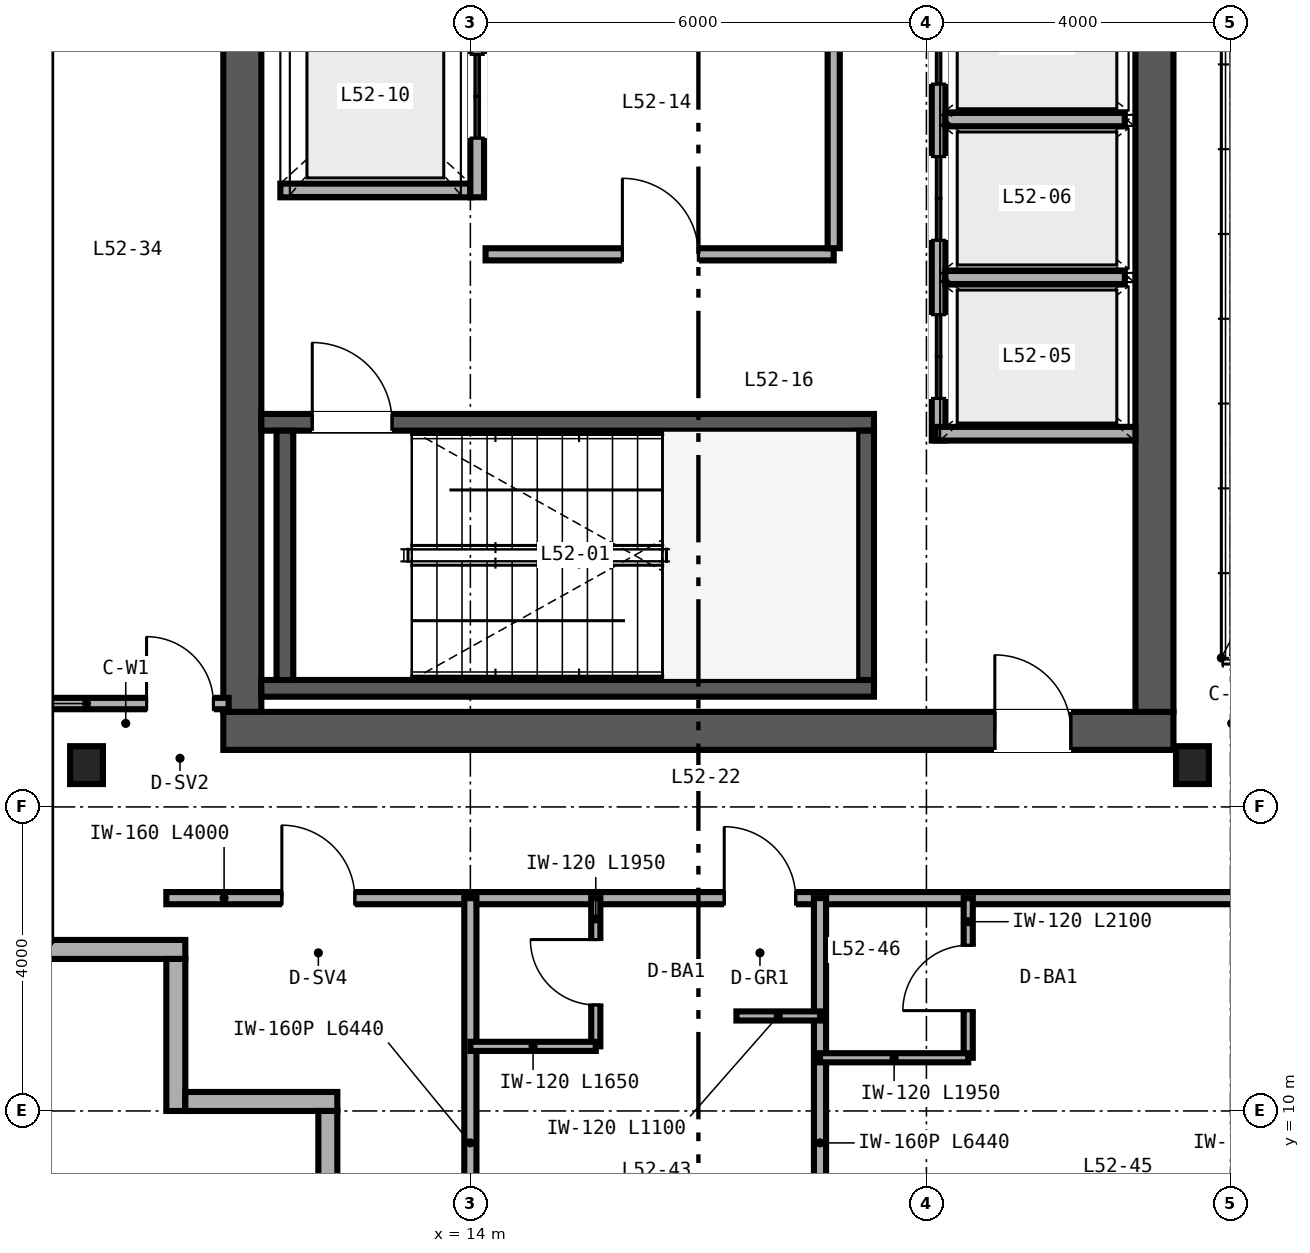
"""IFC4 building model, lengths in metres.
Left out: names, types, materials, properties, quantities, classifications, styles, units other than length and angle.
Written with IfcOpenShell. Run it as: python <this file> out.ifc"""

import sys

from ifc_helpers import new_model, si_unit, direction, frame, frame_2d, origin, origin_2d, place, context, subcontext, project, spatial, rectangle, i_section, extrude, source, transform, mapped, element, fill, save


model = new_model("IFC4")
c1 = context("Model", 3, precision=1e-05, world=origin(), true_north=direction((0.0, 1.0)))
c2 = subcontext(c1, "Body", "Model", "MODEL_VIEW")
j1 = project(units=[si_unit("LENGTHUNIT", "METRE"), si_unit("PLANEANGLEUNIT", "RADIAN")], contexts=[c1])
p1 = place(None, origin())
s1 = spatial("IfcSite", under=j1, at=p1, CompositionType="ELEMENT")
p2 = place(p1, origin())
s2 = spatial("IfcBuilding", under=s1, at=p2, CompositionType="ELEMENT")
p3 = place(p2, frame((0.0, 0.0, 206.4)))
s3 = spatial("IfcBuildingStorey", under=s2, at=p3, CompositionType="ELEMENT", Elevation=206.4)
p4 = place(p3, frame((10.75, 15.0, 0.0), z_axis=(0.0, 0.0, 1.0), x_axis=(1.0, 0.0, 0.0)))
e1 = element("IfcWall", 1, at=p4, inside=s3, PredefinedType="SHEAR", context=c2, shape_type="SweptSolid", body=[
    extrude(rectangle(XDim=12.5, YDim=0.5, at=frame_2d((6.25, 0.0))), origin(), (0.0, 0.0, 1.0), 3.37),
])
p5 = place(p4, frame((10.15, 0.0, 0.0)))
e2 = element("IfcOpeningElement", 2, at=p5, cuts=e1, PredefinedType="OPENING", context=c2, shape_type="SweptSolid", body=[
    extrude(rectangle(XDim=1.0, YDim=2.15, at=frame_2d((0.5, 1.075))), frame((0.0, 0.26, 0.0), z_axis=(0.0, -1.0, 0.0), x_axis=(1.0, 0.0, 0.0)), (0.0, 0.0, 1.0), 0.52),
])
for number, where, z_axis, x_axis in (
    (3, (11.0, 15.25, 0.0), (0.0, 0.0, 1.0), (0.0, 1.0, 0.0)),
    (4, (23.0, 15.25, 0.0), (0.0, 0.0, 1.0), (0.0, 1.0, 0.0)),
):
    element("IfcWall", number, at=place(p3, frame(where, z_axis=z_axis, x_axis=x_axis)), inside=s3, PredefinedType="SHEAR", context=c2, shape_type="SweptSolid", body=[
        extrude(rectangle(XDim=21.5, YDim=0.5, at=frame_2d((10.75, 0.0))), origin(), (0.0, 0.0, 1.0), 3.37),
    ])
p6 = place(p3, frame((11.25, 15.56, 0.0), z_axis=(0.0, 0.0, 1.0), x_axis=(1.0, 0.0, 0.0)))
e5 = element("IfcWall", 5, at=p6, inside=s3, PredefinedType="SHEAR", context=c2, shape_type="SweptSolid", body=[
    extrude(rectangle(XDim=8.06, YDim=0.22, at=frame_2d((4.03, 0.0))), origin(), (0.0, 0.0, 1.0), 3.4),
])
p7 = place(p3, frame((11.25, 19.06, 0.0), z_axis=(0.0, 0.0, 1.0), x_axis=(1.0, 0.0, 0.0)))
e6 = element("IfcWall", 6, at=p7, inside=s3, PredefinedType="SHEAR", context=c2, shape_type="SweptSolid", body=[
    extrude(rectangle(XDim=8.06, YDim=0.22, at=frame_2d((4.03, 0.0))), origin(), (0.0, 0.0, 1.0), 3.4),
])
p8 = place(p7, frame((0.67, 0.0, 0.0)))
e7 = element("IfcOpeningElement", 7, at=p8, cuts=e6, PredefinedType="OPENING", context=c2, shape_type="SweptSolid", body=[
    extrude(rectangle(XDim=1.05, YDim=2.15, at=frame_2d((0.525, 1.075))), frame((0.0, 0.12, 0.0), z_axis=(0.0, -1.0, 0.0), x_axis=(1.0, 0.0, 0.0)), (0.0, 0.0, 1.0), 0.24),
])
for number, where, z_axis, x_axis in (
    (8, (11.56, 15.67, 0.0), (0.0, 0.0, 1.0), (0.0, 1.0, 0.0)),
    (9, (19.2, 15.67, 0.0), (0.0, 0.0, 1.0), (0.0, 1.0, 0.0)),
):
    element("IfcWall", number, at=place(p3, frame(where, z_axis=z_axis, x_axis=x_axis)), inside=s3, PredefinedType="SHEAR", context=c2, shape_type="SweptSolid", body=[
        extrude(rectangle(XDim=3.28, YDim=0.22, at=frame_2d((1.64, 0.0))), origin(), (0.0, 0.0, 1.0), 3.4),
    ])
m1 = source(origin(), c2, "Body", "SweptSolid", [
    extrude(i_section(OverallWidth=0.432, OverallDepth=0.498, WebThickness=0.056, FlangeThickness=0.089, FilletRadius=0.025, at=origin_2d()), origin(), (0.0, 0.0, 1.0), 3.37),
])
for number, where, z_axis, x_axis in (
    (10, (8.95, 14.55, 0.0), (0.0, 0.0, 1.0), (1.0, 0.0, 0.0)),
    (11, (23.5, 14.55, 0.0), (0.0, 0.0, 1.0), (1.0, 0.0, 0.0)),
):
    element("IfcColumn", number, at=place(p3, frame(where, z_axis=z_axis, x_axis=x_axis)), inside=s3, PredefinedType="COLUMN", context=c2, shape_type="MappedRepresentation", body=[
        mapped(m1, transform((0.0, 0.0, 0.0), scale=1.0)),
    ])
p9 = place(p3, frame((8.0, 12.125, 0.0), z_axis=(0.0, 0.0, 1.0), x_axis=(1.0, 0.0, 0.0)))
e12 = element("IfcWall", 12, at=p9, inside=s3, PredefinedType="SOLIDWALL", context=c2, shape_type="SweptSolid", body=[
    extrude(rectangle(XDim=2.25, YDim=0.25, at=frame_2d((1.125, 0.0))), origin(), (0.0, 0.0, 1.0), 3.37),
])
for number, where, z_axis, x_axis in (
    (13, (10.125, 12.0, 0.0), (0.0, 0.0, 1.0), (0.0, -1.0, 0.0)),
    (14, (10.25, 10.125, 0.0), (0.0, 0.0, 1.0), (1.0, 0.0, 0.0)),
    (15, (12.125, 10.0, 0.0), (0.0, 0.0, 1.0), (0.0, -1.0, 0.0)),
):
    element("IfcWall", number, at=place(p3, frame(where, z_axis=z_axis, x_axis=x_axis)), inside=s3, PredefinedType="SOLIDWALL", context=c2, shape_type="SweptSolid", body=[
        extrude(rectangle(XDim=2.0, YDim=0.25, at=frame_2d((1.0, 0.0))), origin(), (0.0, 0.0, 1.0), 3.37),
    ])
p10 = place(p3, frame((20.16, 18.82, 0.0), z_axis=(0.0, 0.0, 1.0), x_axis=(0.0, 1.0, 0.0)))
e16 = element("IfcWall", 16, at=p10, inside=s3, PredefinedType="SOLIDWALL", context=c2, shape_type="SweptSolid", body=[
    extrude(rectangle(XDim=6.32, YDim=0.18, at=frame_2d((3.16, 0.0))), origin(), (0.0, 0.0, 1.0), 2.47),
])
p11 = place(p10, frame((0.555, 0.0, 0.0)))
e17 = element("IfcOpeningElement", 17, at=p11, cuts=e16, PredefinedType="OPENING", context=c2, shape_type="SweptSolid", body=[
    extrude(rectangle(XDim=1.1, YDim=2.2, at=frame_2d((0.55, 1.1))), frame((0.0, 0.1, 0.0), z_axis=(0.0, -1.0, 0.0), x_axis=(1.0, 0.0, 0.0)), (0.0, 0.0, 1.0), 0.2),
])
p12 = place(p10, frame((2.635, 0.0, 0.0)))
e18 = element("IfcOpeningElement", 18, at=p12, cuts=e16, PredefinedType="OPENING", context=c2, shape_type="SweptSolid", body=[
    extrude(rectangle(XDim=1.1, YDim=2.2, at=frame_2d((0.55, 1.1))), frame((0.0, 0.1, 0.0), z_axis=(0.0, -1.0, 0.0), x_axis=(1.0, 0.0, 0.0)), (0.0, 0.0, 1.0), 0.2),
])
p13 = place(p10, frame((4.69, 0.0, 0.0)))
e19 = element("IfcOpeningElement", 19, at=p13, cuts=e16, PredefinedType="OPENING", context=c2, shape_type="SweptSolid", body=[
    extrude(rectangle(XDim=1.1, YDim=2.2, at=frame_2d((0.55, 1.1))), frame((0.0, 0.1, 0.0), z_axis=(0.0, -1.0, 0.0), x_axis=(1.0, 0.0, 0.0)), (0.0, 0.0, 1.0), 0.2),
])
p14 = place(p3, frame((20.12, 18.91, 0.0), z_axis=(0.0, 0.0, 1.0), x_axis=(1.0, 0.0, 0.0)))
e20 = element("IfcWall", 20, at=p14, inside=s3, PredefinedType="SOLIDWALL", context=c2, shape_type="SweptSolid", body=[
    extrude(rectangle(XDim=2.63, YDim=0.18, at=frame_2d((1.315, 0.0))), origin(), (0.0, 0.0, 1.0), 3.37),
])
p15 = place(p3, frame((20.25, 20.965, 0.0), z_axis=(0.0, 0.0, 1.0), x_axis=(1.0, 0.0, 0.0)))
e21 = element("IfcWall", 21, at=p15, inside=s3, PredefinedType="SOLIDWALL", context=c2, shape_type="SweptSolid", body=[
    extrude(rectangle(XDim=2.36, YDim=0.18, at=frame_2d((1.18, 0.0))), origin(), (0.0, 0.0, 1.0), 2.47),
])
p16 = place(p3, frame((20.25, 23.045, 0.0), z_axis=(0.0, 0.0, 1.0), x_axis=(1.0, 0.0, 0.0)))
e22 = element("IfcWall", 22, at=p16, inside=s3, PredefinedType="SOLIDWALL", context=c2, shape_type="SweptSolid", body=[
    extrude(rectangle(XDim=2.36, YDim=0.18, at=frame_2d((1.18, 0.0))), origin(), (0.0, 0.0, 1.0), 3.37),
])
p17 = place(p3, frame((11.5, 22.11, 0.0), z_axis=(0.0, 0.0, 1.0), x_axis=(1.0, 0.0, 0.0)))
e23 = element("IfcWall", 23, at=p17, inside=s3, PredefinedType="SOLIDWALL", context=c2, shape_type="SweptSolid", body=[
    extrude(rectangle(XDim=2.5, YDim=0.18, at=frame_2d((1.25, 0.0))), origin(), (0.0, 0.0, 1.0), 3.37),
])
p18 = place(p3, frame((14.09, 22.02, 0.0), z_axis=(0.0, 0.0, 1.0), x_axis=(0.0, 1.0, 0.0)))
e24 = element("IfcWall", 24, at=p18, inside=s3, PredefinedType="SOLIDWALL", context=c2, shape_type="SweptSolid", body=[
    extrude(rectangle(XDim=2.66, YDim=0.18, at=frame_2d((1.33, 0.0))), origin(), (0.0, 0.0, 1.0), 3.37),
])
p19 = place(p18, frame((0.78, 0.0, 0.0)))
e25 = element("IfcOpeningElement", 25, at=p19, cuts=e24, PredefinedType="OPENING", context=c2, shape_type="SweptSolid", body=[
    extrude(rectangle(XDim=1.1, YDim=2.2, at=frame_2d((0.55, 1.1))), frame((0.0, 0.1, 0.0), z_axis=(0.0, -1.0, 0.0), x_axis=(1.0, 0.0, 0.0)), (0.0, 0.0, 1.0), 0.2),
])
p20 = place(p3, frame((14.2, 21.27, 0.0), z_axis=(0.0, 0.0, 1.0), x_axis=(1.0, 0.0, 0.0)))
e26 = element("IfcWall", 26, at=p20, inside=s3, PredefinedType="PARTITIONING", context=c2, shape_type="SweptSolid", body=[
    extrude(rectangle(XDim=4.58, YDim=0.16, at=frame_2d((2.29, 0.0))), origin(), (0.0, 0.0, 1.0), 3.37),
])
p21 = place(p20, frame((1.8, 0.0, 0.0)))
e27 = element("IfcOpeningElement", 27, at=p21, cuts=e26, PredefinedType="OPENING", context=c2, shape_type="SweptSolid", body=[
    extrude(rectangle(XDim=1.0, YDim=2.15, at=frame_2d((0.5, 1.075))), frame((0.0, 0.09, 0.0), z_axis=(0.0, -1.0, 0.0), x_axis=(1.0, 0.0, 0.0)), (0.0, 0.0, 1.0), 0.18),
])
p22 = place(p3, frame((18.78, 21.35, 0.0), z_axis=(0.0, 0.0, 1.0), x_axis=(0.0, 1.0, 0.0)))
e28 = element("IfcWall", 28, at=p22, inside=s3, PredefinedType="PARTITIONING", context=c2, shape_type="SweptSolid", body=[
    extrude(rectangle(XDim=3.81, YDim=0.16, at=frame_2d((1.905, 0.0))), origin(), (0.0, 0.0, 1.0), 3.37),
])
p23 = place(p3, frame((8.16, 15.36, 0.0), z_axis=(0.0, 0.0, 1.0), x_axis=(1.0, 0.0, 0.0)))
e29 = element("IfcWall", 29, at=p23, inside=s3, PredefinedType="PARTITIONING", context=c2, shape_type="SweptSolid", body=[
    extrude(rectangle(XDim=2.66, YDim=0.15, at=frame_2d((1.33, 0.0))), origin(), (0.0, 0.0, 1.0), 2.591),
])
p24 = place(p23, frame((1.58, 0.0, 0.0)))
e30 = element("IfcOpeningElement", 30, at=p24, cuts=e29, PredefinedType="OPENING", context=c2, shape_type="SweptSolid", body=[
    extrude(rectangle(XDim=0.88, YDim=2.15, at=frame_2d((0.44, 1.075))), frame((0.0, 0.085, 0.0), z_axis=(0.0, -1.0, 0.0), x_axis=(1.0, 0.0, 0.0)), (0.0, 0.0, 1.0), 0.17),
])
p25 = place(p3, frame((10.0, 12.8, 0.0), z_axis=(0.0, 0.0, 1.0), x_axis=(1.0, 0.0, 0.0)))
e31 = element("IfcWall", 31, at=p25, inside=s3, PredefinedType="PARTITIONING", context=c2, shape_type="SweptSolid", body=[
    extrude(rectangle(XDim=4.0, YDim=0.16, at=frame_2d((2.0, 0.0))), origin(), (0.0, 0.0, 1.0), 3.37),
])
p26 = place(p25, frame((1.52, 0.0, 0.0)))
e32 = element("IfcOpeningElement", 32, at=p26, cuts=e31, PredefinedType="OPENING", context=c2, shape_type="SweptSolid", body=[
    extrude(rectangle(XDim=0.96, YDim=2.15, at=frame_2d((0.48, 1.075))), frame((0.0, 0.09, 0.0), z_axis=(0.0, -1.0, 0.0), x_axis=(1.0, 0.0, 0.0)), (0.0, 0.0, 1.0), 0.18),
])
p27 = place(p3, frame((14.0, 12.8, 0.0), z_axis=(0.0, 0.0, 1.0), x_axis=(1.0, 0.0, 0.0)))
e33 = element("IfcWall", 33, at=p27, inside=s3, PredefinedType="PARTITIONING", context=c2, shape_type="SweptSolid", body=[
    extrude(rectangle(XDim=12.0, YDim=0.16, at=frame_2d((6.0, 0.0))), origin(), (0.0, 0.0, 1.0), 2.913),
])
p28 = place(p27, frame((3.34, 0.0, 0.0)))
e34 = element("IfcOpeningElement", 34, at=p28, cuts=e33, PredefinedType="OPENING", context=c2, shape_type="SweptSolid", body=[
    extrude(rectangle(XDim=0.94, YDim=2.15, at=frame_2d((0.47, 1.075))), frame((0.0, 0.09, 0.0), z_axis=(0.0, -1.0, 0.0), x_axis=(1.0, 0.0, 0.0)), (0.0, 0.0, 1.0), 0.18),
])
p29 = place(p27, frame((10.7, 0.0, 0.0)))
e35 = element("IfcOpeningElement", 35, at=p29, cuts=e33, PredefinedType="OPENING", context=c2, shape_type="SweptSolid", body=[
    extrude(rectangle(XDim=0.98, YDim=2.2, at=frame_2d((0.49, 1.1))), frame((0.0, 0.09, 0.0), z_axis=(0.0, -1.0, 0.0), x_axis=(1.0, 0.0, 0.0)), (0.0, 0.0, 1.0), 0.18),
])
for number, where, z_axis, x_axis in (
    (36, (14.0, 6.36, 0.0), (0.0, 0.0, 1.0), (0.0, 1.0, 0.0)),
    (37, (18.6, 6.36, 0.0), (0.0, 0.0, 1.0), (0.0, 1.0, 0.0)),
):
    element("IfcWall", number, at=place(p3, frame(where, z_axis=z_axis, x_axis=x_axis)), inside=s3, PredefinedType="PARTITIONING", context=c2, shape_type="SweptSolid", body=[
        extrude(rectangle(XDim=6.44, YDim=0.16, at=frame_2d((3.22, 0.0))), origin(), (0.0, 0.0, 1.0), 2.677),
    ])
p30 = place(p3, frame((15.65, 10.85, 0.0), z_axis=(0.0, 0.0, 1.0), x_axis=(0.0, 1.0, 0.0)))
e38 = element("IfcWall", 38, at=p30, inside=s3, PredefinedType="PARTITIONING", context=c2, shape_type="SweptSolid", body=[
    extrude(rectangle(XDim=1.95, YDim=0.12, at=frame_2d((0.975, 0.0))), origin(), (0.0, 0.0, 1.0), 3.37),
])
p31 = place(p30, frame((0.545, 0.0, 0.0)))
e39 = element("IfcOpeningElement", 39, at=p31, cuts=e38, PredefinedType="OPENING", context=c2, shape_type="SweptSolid", body=[
    extrude(rectangle(XDim=0.86, YDim=2.1, at=frame_2d((0.43, 1.05))), frame((0.0, 0.07, 0.0), z_axis=(0.0, -1.0, 0.0), x_axis=(1.0, 0.0, 0.0)), (0.0, 0.0, 1.0), 0.14),
])
p32 = place(p3, frame((14.0, 10.85, 0.0), z_axis=(0.0, 0.0, 1.0), x_axis=(1.0, 0.0, 0.0)))
e40 = element("IfcWall", 40, at=p32, inside=s3, PredefinedType="PARTITIONING", context=c2, shape_type="SweptSolid", body=[
    extrude(rectangle(XDim=1.65, YDim=0.12, at=frame_2d((0.825, 0.0))), origin(), (0.0, 0.0, 1.0), 3.37),
])
p33 = place(p3, frame((17.5, 11.25, 0.0), z_axis=(0.0, 0.0, 1.0), x_axis=(1.0, 0.0, 0.0)))
e41 = element("IfcWall", 41, at=p33, inside=s3, PredefinedType="PARTITIONING", context=c2, shape_type="SweptSolid", body=[
    extrude(rectangle(XDim=1.1, YDim=0.12, at=frame_2d((0.55, 0.0))), origin(), (0.0, 0.0, 1.0), 3.37),
])
p34 = place(p3, frame((20.55, 10.7, 0.0), z_axis=(0.0, 0.0, 1.0), x_axis=(0.0, 1.0, 0.0)))
e42 = element("IfcWall", 42, at=p34, inside=s3, PredefinedType="PARTITIONING", context=c2, shape_type="SweptSolid", body=[
    extrude(rectangle(XDim=2.1, YDim=0.12, at=frame_2d((1.05, 0.0))), origin(), (0.0, 0.0, 1.0), 3.37),
])
p35 = place(p34, frame((0.62, 0.0, 0.0)))
e43 = element("IfcOpeningElement", 43, at=p35, cuts=e42, PredefinedType="OPENING", context=c2, shape_type="SweptSolid", body=[
    extrude(rectangle(XDim=0.86, YDim=2.1, at=frame_2d((0.43, 1.05))), frame((0.0, 0.07, 0.0), z_axis=(0.0, -1.0, 0.0), x_axis=(1.0, 0.0, 0.0)), (0.0, 0.0, 1.0), 0.14),
])
p36 = place(p3, frame((18.6, 10.7, 0.0), z_axis=(0.0, 0.0, 1.0), x_axis=(1.0, 0.0, 0.0)))
e44 = element("IfcWall", 44, at=p36, inside=s3, PredefinedType="PARTITIONING", context=c2, shape_type="SweptSolid", body=[
    extrude(rectangle(XDim=1.95, YDim=0.12, at=frame_2d((0.975, 0.0))), origin(), (0.0, 0.0, 1.0), 3.37),
])
m2 = source(origin(), c2, "Body", "SweptSolid", [
    extrude(rectangle(XDim=1.05, YDim=2.15, at=frame_2d((0.525, 1.075))), frame((0.0, 0.025, 0.0), z_axis=(0.0, -1.0, 0.0), x_axis=(1.0, 0.0, 0.0)), (0.0, 0.0, 1.0), 0.05),
])
p37 = place(p8, origin())
e45 = element("IfcDoor", 45, at=p37, inside=s3, OperationType="SINGLE_SWING_LEFT", PredefinedType="DOOR", context=c2, shape_type="MappedRepresentation", body=[
    mapped(m2, transform((0.0, 0.0, 0.0), scale=1.0)),
])
fill(e7, e45)
m3 = source(origin(), c2, "Body", "SweptSolid", [
    extrude(rectangle(XDim=1.1, YDim=2.2, at=frame_2d((0.55, 1.1))), frame((0.0, 0.025, 0.0), z_axis=(0.0, -1.0, 0.0), x_axis=(1.0, 0.0, 0.0)), (0.0, 0.0, 1.0), 0.05),
])
p38 = place(p11, origin())
e46 = element("IfcDoor", 46, at=p38, inside=s3, OperationType="DOUBLE_DOOR_SLIDING", PredefinedType="DOOR", context=c2, shape_type="MappedRepresentation", body=[
    mapped(m3, transform((0.0, 0.0, 0.0), scale=1.0)),
])
fill(e17, e46)
p39 = place(p12, origin())
e47 = element("IfcDoor", 47, at=p39, inside=s3, OperationType="DOUBLE_DOOR_SLIDING", PredefinedType="DOOR", context=c2, shape_type="MappedRepresentation", body=[
    mapped(m3, transform((0.0, 0.0, 0.0), scale=1.0)),
])
fill(e18, e47)
p40 = place(p13, origin())
e48 = element("IfcDoor", 48, at=p40, inside=s3, OperationType="DOUBLE_DOOR_SLIDING", PredefinedType="DOOR", context=c2, shape_type="MappedRepresentation", body=[
    mapped(m3, transform((0.0, 0.0, 0.0), scale=1.0)),
])
fill(e19, e48)
p41 = place(p19, origin())
e49 = element("IfcDoor", 49, at=p41, inside=s3, OperationType="DOUBLE_DOOR_SLIDING", PredefinedType="DOOR", context=c2, shape_type="MappedRepresentation", body=[
    mapped(m3, transform((0.0, 0.0, 0.0), scale=1.0)),
])
fill(e25, e49)
m4 = source(origin(), c2, "Body", "SweptSolid", [
    extrude(rectangle(XDim=1.0, YDim=2.15, at=frame_2d((0.5, 1.075))), frame((0.0, 0.025, 0.0), z_axis=(0.0, -1.0, 0.0), x_axis=(1.0, 0.0, 0.0)), (0.0, 0.0, 1.0), 0.05),
])
p42 = place(p21, origin())
e50 = element("IfcDoor", 50, at=p42, inside=s3, OperationType="SINGLE_SWING_LEFT", PredefinedType="DOOR", context=c2, shape_type="MappedRepresentation", body=[
    mapped(m4, transform((0.0, 0.0, 0.0), scale=1.0)),
])
fill(e27, e50)
p43 = place(p5, origin())
e51 = element("IfcDoor", 51, at=p43, inside=s3, OperationType="SINGLE_SWING_LEFT", PredefinedType="DOOR", context=c2, shape_type="MappedRepresentation", body=[
    mapped(m4, transform((0.0, 0.0, 0.0), scale=1.0)),
])
fill(e2, e51)
m5 = source(origin(), c2, "Body", "SweptSolid", [
    extrude(rectangle(XDim=0.88, YDim=2.15, at=frame_2d((0.44, 1.075))), frame((0.0, 0.025, 0.0), z_axis=(0.0, -1.0, 0.0), x_axis=(1.0, 0.0, 0.0)), (0.0, 0.0, 1.0), 0.05),
])
p44 = place(p24, origin())
e52 = element("IfcDoor", 52, at=p44, inside=s3, OperationType="SINGLE_SWING_LEFT", PredefinedType="DOOR", context=c2, shape_type="MappedRepresentation", body=[
    mapped(m5, transform((0.0, 0.0, 0.0), scale=1.0)),
])
fill(e30, e52)
m6 = source(origin(), c2, "Body", "SweptSolid", [
    extrude(rectangle(XDim=0.96, YDim=2.15, at=frame_2d((0.48, 1.075))), frame((0.0, 0.025, 0.0), z_axis=(0.0, -1.0, 0.0), x_axis=(1.0, 0.0, 0.0)), (0.0, 0.0, 1.0), 0.05),
])
p45 = place(p26, origin())
e53 = element("IfcDoor", 53, at=p45, inside=s3, OperationType="SINGLE_SWING_LEFT", PredefinedType="DOOR", context=c2, shape_type="MappedRepresentation", body=[
    mapped(m6, transform((0.0, 0.0, 0.0), scale=1.0)),
])
fill(e32, e53)
m7 = source(origin(), c2, "Body", "SweptSolid", [
    extrude(rectangle(XDim=0.86, YDim=2.1, at=frame_2d((0.43, 1.05))), frame((0.0, 0.025, 0.0), z_axis=(0.0, -1.0, 0.0), x_axis=(1.0, 0.0, 0.0)), (0.0, 0.0, 1.0), 0.05),
])
p46 = place(p31, origin())
e54 = element("IfcDoor", 54, at=p46, inside=s3, OperationType="SINGLE_SWING_RIGHT", PredefinedType="DOOR", context=c2, shape_type="MappedRepresentation", body=[
    mapped(m7, transform((0.0, 0.0, 0.0), scale=1.0)),
])
fill(e39, e54)
p47 = place(p35, origin())
e55 = element("IfcDoor", 55, at=p47, inside=s3, OperationType="SINGLE_SWING_LEFT", PredefinedType="DOOR", context=c2, shape_type="MappedRepresentation", body=[
    mapped(m7, transform((0.0, 0.0, 0.0), scale=1.0)),
])
fill(e43, e55)
m8 = source(origin(), c2, "Body", "SweptSolid", [
    extrude(rectangle(XDim=0.94, YDim=2.15, at=frame_2d((0.47, 1.075))), frame((0.0, 0.025, 0.0), z_axis=(0.0, -1.0, 0.0), x_axis=(1.0, 0.0, 0.0)), (0.0, 0.0, 1.0), 0.05),
])
p48 = place(p28, origin())
e56 = element("IfcDoor", 56, at=p48, inside=s3, OperationType="SINGLE_SWING_LEFT", PredefinedType="DOOR", context=c2, shape_type="MappedRepresentation", body=[
    mapped(m8, transform((0.0, 0.0, 0.0), scale=1.0)),
])
fill(e34, e56)
save(model, sys.argv[1])
